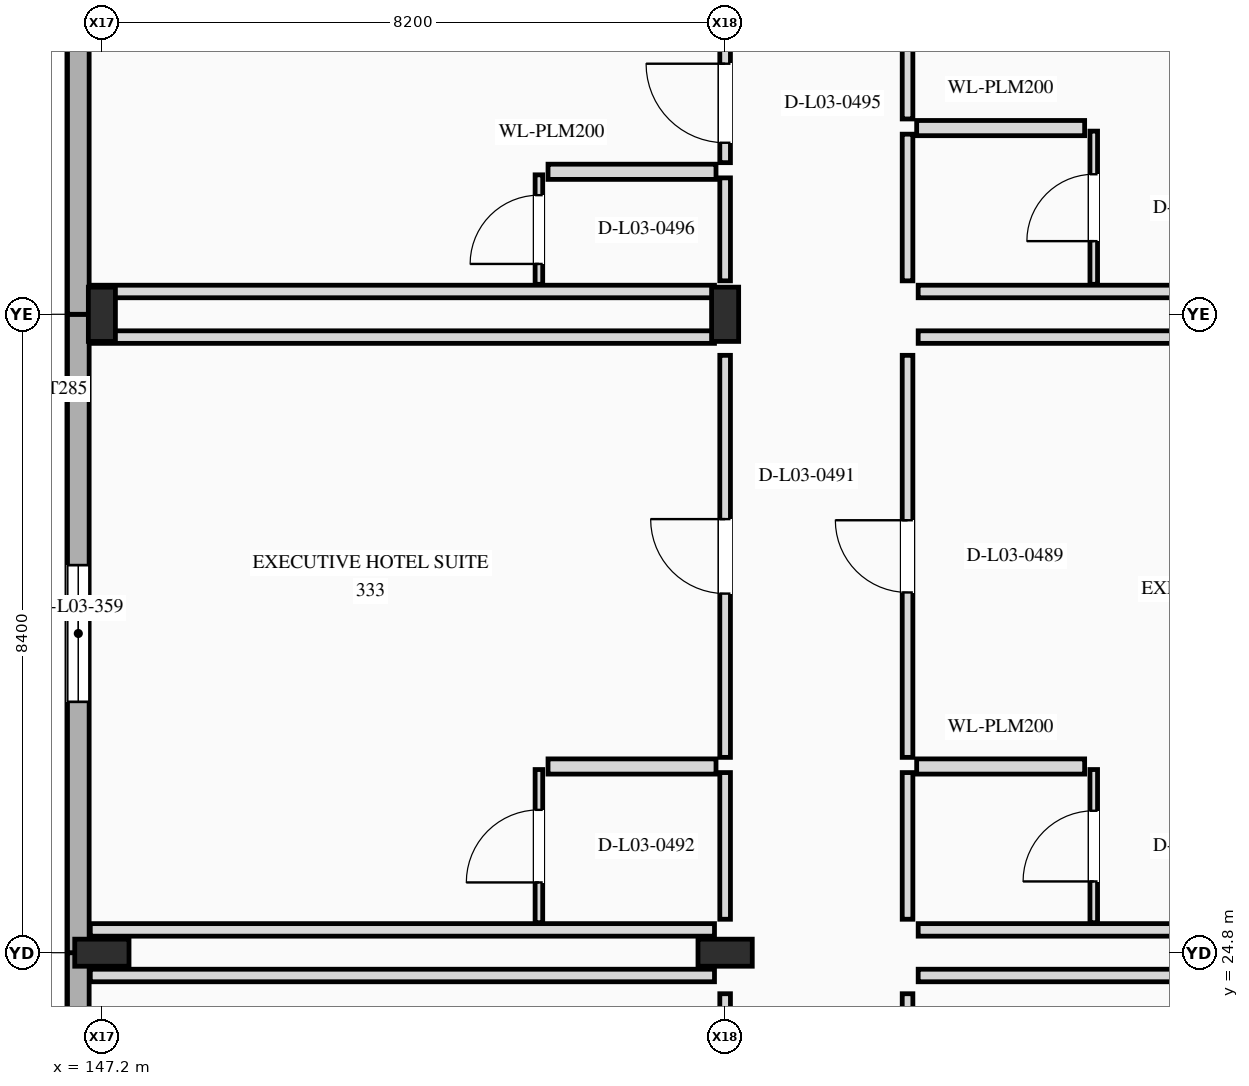
"""IFC4 building model, lengths in metres.
Left out: names, types, materials, properties, quantities, classifications, styles, units other than length and angle.
Written with IfcOpenShell. Run it as: python <this file> out.ifc"""

import sys

from ifc_helpers import new_model, si_unit, direction, frame, frame_2d, origin, origin_2d, place, context, subcontext, project, spatial, rectangle, i_section, extrude, element, fill, save


model = new_model("IFC4")
c1 = context("Model", 3, precision=1e-05, world=origin(), true_north=direction((0.0, 1.0)))
c2 = subcontext(c1, "Body", "Model", "MODEL_VIEW")
j1 = project(units=[si_unit("LENGTHUNIT", "METRE"), si_unit("PLANEANGLEUNIT", "RADIAN")], contexts=[c1])
p1 = place(None, origin())
s1 = spatial("IfcSite", under=j1, at=p1, CompositionType="ELEMENT")
p2 = place(p1, origin())
s2 = spatial("IfcBuilding", under=s1, at=p2, CompositionType="ELEMENT")
p3 = place(p2, frame((0.0, 0.0, 15.6)))
s3 = spatial("IfcBuildingStorey", under=s2, at=p3, CompositionType="ELEMENT", Elevation=15.6)
for number, where, z_axis, x_axis in (
    (1, (147.2, 24.8, 0.0), (0.0, 0.0, 1.0), (0.0, 1.0, 0.0)),
    (2, (147.2, 33.2, 0.0), (0.0, 0.0, 1.0), (1.0, 0.0, 0.0)),
    (3, (155.4, 24.8, 0.0), (0.0, 0.0, 1.0), (0.0, 1.0, 0.0)),
    (4, (155.4, 33.2, 0.0), (0.0, 0.0, 1.0), (1.0, 0.0, 0.0)),
):
    element("IfcColumn", number, at=place(p3, frame(where, z_axis=z_axis, x_axis=x_axis)), inside=s3, PredefinedType="COLUMN", context=c2, shape_type="SweptSolid", body=[
        extrude(i_section(OverallWidth=0.356, OverallDepth=0.714, WebThickness=0.019, FlangeThickness=0.034, at=origin_2d()), origin(), (0.0, 0.0, 1.0), 3.9),
    ])
p4 = place(p3, frame((146.89, 19.254, 0.0), z_axis=(0.0, 0.0, 1.0), x_axis=(0.0, 1.0, 0.0)))
e5 = element("IfcWall", 5, at=p4, inside=s3, PredefinedType="STANDARD", context=c2, shape_type="SweptSolid", body=[
    extrude(rectangle(XDim=5.546, YDim=0.285, at=frame_2d((2.773, 0.0))), origin(), (0.0, 0.0, 1.0), 3.9),
])
p5 = place(p4, frame((2.048, 0.0, 0.85)))
e6 = element("IfcOpeningElement", 6, at=p5, cuts=e5, PredefinedType="OPENING", context=c2, shape_type="SweptSolid", body=[
    extrude(rectangle(XDim=1.1, YDim=1.5, at=frame_2d((0.55, 0.75))), frame((0.0, 0.152, 0.0), z_axis=(0.0, -1.0, 0.0), x_axis=(1.0, 0.0, 0.0)), (0.0, 0.0, 1.0), 0.305),
])
p6 = place(p3, frame((146.89, 24.8, 0.0), z_axis=(0.0, 0.0, 1.0), x_axis=(0.0, 1.0, 0.0)))
e7 = element("IfcWall", 7, at=p6, inside=s3, PredefinedType="STANDARD", context=c2, shape_type="SweptSolid", body=[
    extrude(rectangle(XDim=8.4, YDim=0.285, at=frame_2d((4.2, 0.0))), origin(), (0.0, 0.0, 1.0), 3.9),
])
p7 = place(p6, frame((3.3, 0.0, 0.85)))
e8 = element("IfcOpeningElement", 8, at=p7, cuts=e7, PredefinedType="OPENING", context=c2, shape_type="SweptSolid", body=[
    extrude(rectangle(XDim=1.8, YDim=1.8, at=frame_2d((0.9, 0.9))), frame((0.0, 0.152, 0.0), z_axis=(0.0, -1.0, 0.0), x_axis=(1.0, 0.0, 0.0)), (0.0, 0.0, 1.0), 0.305),
])
p8 = place(p3, frame((146.89, 33.2, 0.0), z_axis=(0.0, 0.0, 1.0), x_axis=(0.0, 1.0, 0.0)))
e9 = element("IfcWall", 9, at=p8, inside=s3, PredefinedType="STANDARD", context=c2, shape_type="SweptSolid", body=[
    extrude(rectangle(XDim=8.4, YDim=0.285, at=frame_2d((4.2, 0.0))), origin(), (0.0, 0.0, 1.0), 3.9),
])
p9 = place(p3, frame((157.8, 21.37, 0.0), z_axis=(0.0, 0.0, 1.0), x_axis=(0.0, 1.0, 0.0)))
e10 = element("IfcWall", 10, at=p9, inside=s3, PredefinedType="PARTITIONING", context=c2, shape_type="SweptSolid", body=[
    extrude(rectangle(XDim=2.89, YDim=0.14, at=frame_2d((1.445, 0.0))), origin(), (0.0, 0.0, 1.0), 3.158),
])
p10 = place(p9, frame((0.91, 0.0, 0.0)))
e11 = element("IfcOpeningElement", 11, at=p10, cuts=e10, PredefinedType="OPENING", context=c2, shape_type="SweptSolid", body=[
    extrude(rectangle(XDim=1.07, YDim=2.4, at=frame_2d((0.535, 1.2))), frame((0.0, 0.08, 0.0), z_axis=(0.0, -1.0, 0.0), x_axis=(1.0, 0.0, 0.0)), (0.0, 0.0, 1.0), 0.16),
])
p11 = place(p3, frame((157.94, 24.5, 0.0), z_axis=(0.0, 0.0, 1.0), x_axis=(1.0, 0.0, 0.0)))
e12 = element("IfcWall", 12, at=p11, inside=s3, PredefinedType="PARTITIONING", context=c2, shape_type="SweptSolid", body=[
    extrude(rectangle(XDim=8.213, YDim=0.165, at=frame_2d((4.106, 0.0))), origin(), (0.0, 0.0, 1.0), 2.99),
])
p12 = place(p3, frame((155.4, 21.37, 0.0), z_axis=(0.0, 0.0, 1.0), x_axis=(0.0, 1.0, 0.0)))
e13 = element("IfcWall", 13, at=p12, inside=s3, PredefinedType="PARTITIONING", context=c2, shape_type="SweptSolid", body=[
    extrude(rectangle(XDim=2.89, YDim=0.14, at=frame_2d((1.445, 0.0))), origin(), (0.0, 0.0, 1.0), 3.074),
])
p13 = place(p12, frame((0.985, 0.0, 0.0)))
e14 = element("IfcOpeningElement", 14, at=p13, cuts=e13, PredefinedType="OPENING", context=c2, shape_type="SweptSolid", body=[
    extrude(rectangle(XDim=0.92, YDim=2.15, at=frame_2d((0.46, 1.075))), frame((0.0, 0.08, 0.0), z_axis=(0.0, -1.0, 0.0), x_axis=(1.0, 0.0, 0.0)), (0.0, 0.0, 1.0), 0.16),
])
p14 = place(p3, frame((147.048, 24.5, 0.0), z_axis=(0.0, 0.0, 1.0), x_axis=(1.0, 0.0, 0.0)))
e15 = element("IfcWall", 15, at=p14, inside=s3, PredefinedType="PARTITIONING", context=c2, shape_type="SweptSolid", body=[
    extrude(rectangle(XDim=8.212, YDim=0.165, at=frame_2d((4.106, 0.0))), origin(), (0.0, 0.0, 1.0), 3.013),
])
p15 = place(p3, frame((157.8, 25.24, 0.0), z_axis=(0.0, 0.0, 1.0), x_axis=(0.0, 1.0, 0.0)))
e16 = element("IfcWall", 16, at=p15, inside=s3, PredefinedType="PARTITIONING", context=c2, shape_type="SweptSolid", body=[
    extrude(rectangle(XDim=1.93, YDim=0.14, at=frame_2d((0.965, 0.0))), origin(), (0.0, 0.0, 1.0), 3.158),
])
p16 = place(p3, frame((157.8, 27.37, 0.0), z_axis=(0.0, 0.0, 1.0), x_axis=(0.0, 1.0, 0.0)))
e17 = element("IfcWall", 17, at=p16, inside=s3, PredefinedType="PARTITIONING", context=c2, shape_type="SweptSolid", body=[
    extrude(rectangle(XDim=5.29, YDim=0.14, at=frame_2d((2.645, 0.0))), origin(), (0.0, 0.0, 1.0), 3.158),
])
p17 = place(p16, frame((2.17, 0.0, 0.0)))
e18 = element("IfcOpeningElement", 18, at=p17, cuts=e17, PredefinedType="OPENING", context=c2, shape_type="SweptSolid", body=[
    extrude(rectangle(XDim=0.95, YDim=2.15, at=frame_2d((0.475, 1.075))), frame((0.0, 0.08, 0.0), z_axis=(0.0, -1.0, 0.0), x_axis=(1.0, 0.0, 0.0)), (0.0, 0.0, 1.0), 0.16),
])
for number, where, z_axis, x_axis in (
    (19, (157.94, 25.1, 0.0), (0.0, 0.0, 1.0), (1.0, 0.0, 0.0)),
    (20, (157.94, 32.9, 0.0), (0.0, 0.0, 1.0), (1.0, 0.0, 0.0)),
):
    element("IfcWall", number, at=place(p3, frame(where, z_axis=z_axis, x_axis=x_axis)), inside=s3, PredefinedType="PARTITIONING", context=c2, shape_type="SweptSolid", body=[
        extrude(rectangle(XDim=8.213, YDim=0.165, at=frame_2d((4.106, 0.0))), origin(), (0.0, 0.0, 1.0), 2.99),
    ])
p18 = place(p3, frame((157.92, 27.25, 0.0), z_axis=(0.0, 0.0, 1.0), x_axis=(1.0, 0.0, 0.0)))
e21 = element("IfcWall", 21, at=p18, inside=s3, PredefinedType="PLUMBINGWALL", context=c2, shape_type="SweptSolid", body=[
    extrude(rectangle(XDim=2.21, YDim=0.2, at=frame_2d((1.105, 0.0))), origin(), (0.0, 0.0, 1.0), 3.6),
])
p19 = place(p3, frame((160.25, 25.195, 0.0), z_axis=(0.0, 0.0, 1.0), x_axis=(0.0, 1.0, 0.0)))
e22 = element("IfcWall", 22, at=p19, inside=s3, PredefinedType="PARTITIONING", context=c2, shape_type="SweptSolid", body=[
    extrude(rectangle(XDim=2.015, YDim=0.1, at=frame_2d((1.008, 0.0))), origin(), (0.0, 0.0, 1.0), 3.158),
])
p20 = place(p19, frame((0.543, 0.0, 0.0)))
e23 = element("IfcOpeningElement", 23, at=p20, cuts=e22, PredefinedType="OPENING", context=c2, shape_type="SweptSolid", body=[
    extrude(rectangle(XDim=0.93, YDim=2.14, at=frame_2d((0.465, 1.07))), frame((0.0, 0.06, 0.0), z_axis=(0.0, -1.0, 0.0), x_axis=(1.0, 0.0, 0.0)), (0.0, 0.0, 1.0), 0.12),
])
p21 = place(p3, frame((155.4, 25.24, 0.0), z_axis=(0.0, 0.0, 1.0), x_axis=(0.0, 1.0, 0.0)))
e24 = element("IfcWall", 24, at=p21, inside=s3, PredefinedType="PARTITIONING", context=c2, shape_type="SweptSolid", body=[
    extrude(rectangle(XDim=1.93, YDim=0.14, at=frame_2d((0.965, 0.0))), origin(), (0.0, 0.0, 1.0), 3.074),
])
p22 = place(p3, frame((155.4, 27.37, 0.0), z_axis=(0.0, 0.0, 1.0), x_axis=(0.0, 1.0, 0.0)))
e25 = element("IfcWall", 25, at=p22, inside=s3, PredefinedType="PARTITIONING", context=c2, shape_type="SweptSolid", body=[
    extrude(rectangle(XDim=5.29, YDim=0.14, at=frame_2d((2.645, 0.0))), origin(), (0.0, 0.0, 1.0), 3.074),
])
p23 = place(p22, frame((2.155, 0.0, 0.0)))
e26 = element("IfcOpeningElement", 26, at=p23, cuts=e25, PredefinedType="OPENING", context=c2, shape_type="SweptSolid", body=[
    extrude(rectangle(XDim=0.98, YDim=2.2, at=frame_2d((0.49, 1.1))), frame((0.0, 0.08, 0.0), z_axis=(0.0, -1.0, 0.0), x_axis=(1.0, 0.0, 0.0)), (0.0, 0.0, 1.0), 0.16),
])
for number, where, z_axis, x_axis in (
    (27, (147.048, 25.1, 0.0), (0.0, 0.0, 1.0), (1.0, 0.0, 0.0)),
    (28, (147.048, 32.9, 0.0), (0.0, 0.0, 1.0), (1.0, 0.0, 0.0)),
):
    element("IfcWall", number, at=place(p3, frame(where, z_axis=z_axis, x_axis=x_axis)), inside=s3, PredefinedType="PARTITIONING", context=c2, shape_type="SweptSolid", body=[
        extrude(rectangle(XDim=8.212, YDim=0.165, at=frame_2d((4.106, 0.0))), origin(), (0.0, 0.0, 1.0), 3.013),
    ])
p24 = place(p3, frame((153.07, 27.25, 0.0), z_axis=(0.0, 0.0, 1.0), x_axis=(1.0, 0.0, 0.0)))
e29 = element("IfcWall", 29, at=p24, inside=s3, PredefinedType="PLUMBINGWALL", context=c2, shape_type="SweptSolid", body=[
    extrude(rectangle(XDim=2.21, YDim=0.2, at=frame_2d((1.105, 0.0))), origin(), (0.0, 0.0, 1.0), 3.6),
])
p25 = place(p3, frame((152.95, 25.195, 0.0), z_axis=(0.0, 0.0, 1.0), x_axis=(0.0, 1.0, 0.0)))
e30 = element("IfcWall", 30, at=p25, inside=s3, PredefinedType="PARTITIONING", context=c2, shape_type="SweptSolid", body=[
    extrude(rectangle(XDim=2.015, YDim=0.1, at=frame_2d((1.008, 0.0))), origin(), (0.0, 0.0, 1.0), 3.208),
])
p26 = place(p25, frame((0.53, 0.0, 0.0)))
e31 = element("IfcOpeningElement", 31, at=p26, cuts=e30, PredefinedType="OPENING", context=c2, shape_type="SweptSolid", body=[
    extrude(rectangle(XDim=0.955, YDim=2.14, at=frame_2d((0.478, 1.07))), frame((0.0, 0.06, 0.0), z_axis=(0.0, -1.0, 0.0), x_axis=(1.0, 0.0, 0.0)), (0.0, 0.0, 1.0), 0.12),
])
p27 = place(p3, frame((157.8, 33.64, 0.0), z_axis=(0.0, 0.0, 1.0), x_axis=(0.0, 1.0, 0.0)))
e32 = element("IfcWall", 32, at=p27, inside=s3, PredefinedType="PARTITIONING", context=c2, shape_type="SweptSolid", body=[
    extrude(rectangle(XDim=1.93, YDim=0.14, at=frame_2d((0.965, 0.0))), origin(), (0.0, 0.0, 1.0), 3.153),
])
p28 = place(p3, frame((157.8, 35.77, 0.0), z_axis=(0.0, 0.0, 1.0), x_axis=(0.0, 1.0, 0.0)))
e33 = element("IfcWall", 33, at=p28, inside=s3, PredefinedType="PARTITIONING", context=c2, shape_type="SweptSolid", body=[
    extrude(rectangle(XDim=5.29, YDim=0.14, at=frame_2d((2.645, 0.0))), origin(), (0.0, 0.0, 1.0), 3.153),
])
p29 = place(p28, frame((2.14, 0.0, 0.0)))
e34 = element("IfcOpeningElement", 34, at=p29, cuts=e33, PredefinedType="OPENING", context=c2, shape_type="SweptSolid", body=[
    extrude(rectangle(XDim=1.01, YDim=2.2, at=frame_2d((0.505, 1.1))), frame((0.0, 0.08, 0.0), z_axis=(0.0, -1.0, 0.0), x_axis=(1.0, 0.0, 0.0)), (0.0, 0.0, 1.0), 0.16),
])
p30 = place(p3, frame((157.94, 33.5, 0.0), z_axis=(0.0, 0.0, 1.0), x_axis=(1.0, 0.0, 0.0)))
e35 = element("IfcWall", 35, at=p30, inside=s3, PredefinedType="PARTITIONING", context=c2, shape_type="SweptSolid", body=[
    extrude(rectangle(XDim=8.213, YDim=0.165, at=frame_2d((4.106, 0.0))), origin(), (0.0, 0.0, 1.0), 2.99),
])
p31 = place(p3, frame((157.92, 35.65, 0.0), z_axis=(0.0, 0.0, 1.0), x_axis=(1.0, 0.0, 0.0)))
e36 = element("IfcWall", 36, at=p31, inside=s3, PredefinedType="PLUMBINGWALL", context=c2, shape_type="SweptSolid", body=[
    extrude(rectangle(XDim=2.21, YDim=0.2, at=frame_2d((1.105, 0.0))), origin(), (0.0, 0.0, 1.0), 3.6),
])
p32 = place(p3, frame((160.25, 33.594, 0.0), z_axis=(0.0, 0.0, 1.0), x_axis=(0.0, 1.0, 0.0)))
e37 = element("IfcWall", 37, at=p32, inside=s3, PredefinedType="PARTITIONING", context=c2, shape_type="SweptSolid", body=[
    extrude(rectangle(XDim=2.016, YDim=0.1, at=frame_2d((1.008, 0.0))), origin(), (0.0, 0.0, 1.0), 3.153),
])
p33 = place(p32, frame((0.568, 0.0, 0.0)))
e38 = element("IfcOpeningElement", 38, at=p33, cuts=e37, PredefinedType="OPENING", context=c2, shape_type="SweptSolid", body=[
    extrude(rectangle(XDim=0.88, YDim=2.18, at=frame_2d((0.44, 1.09))), frame((0.0, 0.06, 0.0), z_axis=(0.0, -1.0, 0.0), x_axis=(1.0, 0.0, 0.0)), (0.0, 0.0, 1.0), 0.12),
])
p34 = place(p3, frame((155.4, 33.64, 0.0), z_axis=(0.0, 0.0, 1.0), x_axis=(0.0, 1.0, 0.0)))
e39 = element("IfcWall", 39, at=p34, inside=s3, PredefinedType="PARTITIONING", context=c2, shape_type="SweptSolid", body=[
    extrude(rectangle(XDim=1.355, YDim=0.14, at=frame_2d((0.678, 0.0))), origin(), (0.0, 0.0, 1.0), 2.99),
])
p35 = place(p3, frame((155.4, 35.195, 0.0), z_axis=(0.0, 0.0, 1.0), x_axis=(0.0, 1.0, 0.0)))
e40 = element("IfcWall", 40, at=p35, inside=s3, PredefinedType="PARTITIONING", context=c2, shape_type="SweptSolid", body=[
    extrude(rectangle(XDim=1.565, YDim=0.14, at=frame_2d((0.782, 0.0))), origin(), (0.0, 0.0, 1.0), 2.99),
])
p36 = place(p35, frame((0.262, 0.0, 0.0)))
e41 = element("IfcOpeningElement", 41, at=p36, cuts=e40, PredefinedType="OPENING", context=c2, shape_type="SweptSolid", body=[
    extrude(rectangle(XDim=1.04, YDim=2.25, at=frame_2d((0.52, 1.125))), frame((0.0, 0.08, 0.0), z_axis=(0.0, -1.0, 0.0), x_axis=(1.0, 0.0, 0.0)), (0.0, 0.0, 1.0), 0.16),
])
p37 = place(p3, frame((147.048, 33.5, 0.0), z_axis=(0.0, 0.0, 1.0), x_axis=(1.0, 0.0, 0.0)))
e42 = element("IfcWall", 42, at=p37, inside=s3, PredefinedType="PARTITIONING", context=c2, shape_type="SweptSolid", body=[
    extrude(rectangle(XDim=8.212, YDim=0.165, at=frame_2d((4.106, 0.0))), origin(), (0.0, 0.0, 1.0), 3.013),
])
p38 = place(p3, frame((153.07, 35.075, 0.0), z_axis=(0.0, 0.0, 1.0), x_axis=(1.0, 0.0, 0.0)))
e43 = element("IfcWall", 43, at=p38, inside=s3, PredefinedType="PLUMBINGWALL", context=c2, shape_type="SweptSolid", body=[
    extrude(rectangle(XDim=2.21, YDim=0.2, at=frame_2d((1.105, 0.0))), origin(), (0.0, 0.0, 1.0), 3.6),
])
p39 = place(p3, frame((152.95, 33.594, 0.0), z_axis=(0.0, 0.0, 1.0), x_axis=(0.0, 1.0, 0.0)))
e44 = element("IfcWall", 44, at=p39, inside=s3, PredefinedType="PARTITIONING", context=c2, shape_type="SweptSolid", body=[
    extrude(rectangle(XDim=1.44, YDim=0.1, at=frame_2d((0.72, 0.0))), origin(), (0.0, 0.0, 1.0), 3.6),
])
p40 = place(p39, frame((0.268, 0.0, 0.0)))
e45 = element("IfcOpeningElement", 45, at=p40, cuts=e44, PredefinedType="OPENING", context=c2, shape_type="SweptSolid", body=[
    extrude(rectangle(XDim=0.905, YDim=2.18, at=frame_2d((0.453, 1.09))), frame((0.0, 0.06, 0.0), z_axis=(0.0, -1.0, 0.0), x_axis=(1.0, 0.0, 0.0)), (0.0, 0.0, 1.0), 0.12),
])
p41 = place(p7, origin())
e46 = element("IfcWindow", 46, at=p41, inside=s3, PartitioningType="SINGLE_PANEL", PredefinedType="WINDOW", context=c2, shape_type="SweptSolid", body=[
    extrude(rectangle(XDim=1.8, YDim=1.8, at=frame_2d((0.9, 0.9))), frame((0.0, 0.03, 0.0), z_axis=(0.0, -1.0, 0.0), x_axis=(1.0, 0.0, 0.0)), (0.0, 0.0, 1.0), 0.06),
])
fill(e8, e46)
p42 = place(p17, origin())
e47 = element("IfcDoor", 47, at=p42, inside=s3, OperationType="SINGLE_SWING_RIGHT", PredefinedType="DOOR", context=c2, shape_type="SweptSolid", body=[
    extrude(rectangle(XDim=0.95, YDim=2.15, at=frame_2d((0.475, 1.075))), frame((0.0, 0.025, 0.0), z_axis=(0.0, -1.0, 0.0), x_axis=(1.0, 0.0, 0.0)), (0.0, 0.0, 1.0), 0.05),
])
fill(e18, e47)
p43 = place(p20, origin())
e48 = element("IfcDoor", 48, at=p43, inside=s3, OperationType="SINGLE_SWING_LEFT", PredefinedType="DOOR", context=c2, shape_type="SweptSolid", body=[
    extrude(rectangle(XDim=0.93, YDim=2.14, at=frame_2d((0.465, 1.07))), frame((0.0, 0.025, 0.0), z_axis=(0.0, -1.0, 0.0), x_axis=(1.0, 0.0, 0.0)), (0.0, 0.0, 1.0), 0.05),
])
fill(e23, e48)
p44 = place(p23, origin())
e49 = element("IfcDoor", 49, at=p44, inside=s3, OperationType="SINGLE_SWING_RIGHT", PredefinedType="DOOR", context=c2, shape_type="SweptSolid", body=[
    extrude(rectangle(XDim=0.98, YDim=2.2, at=frame_2d((0.49, 1.1))), frame((0.0, 0.025, 0.0), z_axis=(0.0, -1.0, 0.0), x_axis=(1.0, 0.0, 0.0)), (0.0, 0.0, 1.0), 0.05),
])
fill(e26, e49)
p45 = place(p26, origin())
e50 = element("IfcDoor", 50, at=p45, inside=s3, OperationType="SINGLE_SWING_LEFT", PredefinedType="DOOR", context=c2, shape_type="SweptSolid", body=[
    extrude(rectangle(XDim=0.955, YDim=2.14, at=frame_2d((0.478, 1.07))), frame((0.0, 0.025, 0.0), z_axis=(0.0, -1.0, 0.0), x_axis=(1.0, 0.0, 0.0)), (0.0, 0.0, 1.0), 0.05),
])
fill(e31, e50)
p46 = place(p33, origin())
e51 = element("IfcDoor", 51, at=p46, inside=s3, OperationType="SINGLE_SWING_LEFT", PredefinedType="DOOR", context=c2, shape_type="SweptSolid", body=[
    extrude(rectangle(XDim=0.88, YDim=2.18, at=frame_2d((0.44, 1.09))), frame((0.0, 0.025, 0.0), z_axis=(0.0, -1.0, 0.0), x_axis=(1.0, 0.0, 0.0)), (0.0, 0.0, 1.0), 0.05),
])
fill(e38, e51)
p47 = place(p36, origin())
e52 = element("IfcDoor", 52, at=p47, inside=s3, OperationType="SINGLE_SWING_RIGHT", PredefinedType="DOOR", context=c2, shape_type="SweptSolid", body=[
    extrude(rectangle(XDim=1.04, YDim=2.25, at=frame_2d((0.52, 1.125))), frame((0.0, 0.025, 0.0), z_axis=(0.0, -1.0, 0.0), x_axis=(1.0, 0.0, 0.0)), (0.0, 0.0, 1.0), 0.05),
])
fill(e41, e52)
p48 = place(p40, origin())
e53 = element("IfcDoor", 53, at=p48, inside=s3, OperationType="SINGLE_SWING_LEFT", PredefinedType="DOOR", context=c2, shape_type="SweptSolid", body=[
    extrude(rectangle(XDim=0.905, YDim=2.18, at=frame_2d((0.453, 1.09))), frame((0.0, 0.025, 0.0), z_axis=(0.0, -1.0, 0.0), x_axis=(1.0, 0.0, 0.0)), (0.0, 0.0, 1.0), 0.05),
])
fill(e45, e53)
save(model, sys.argv[1])
